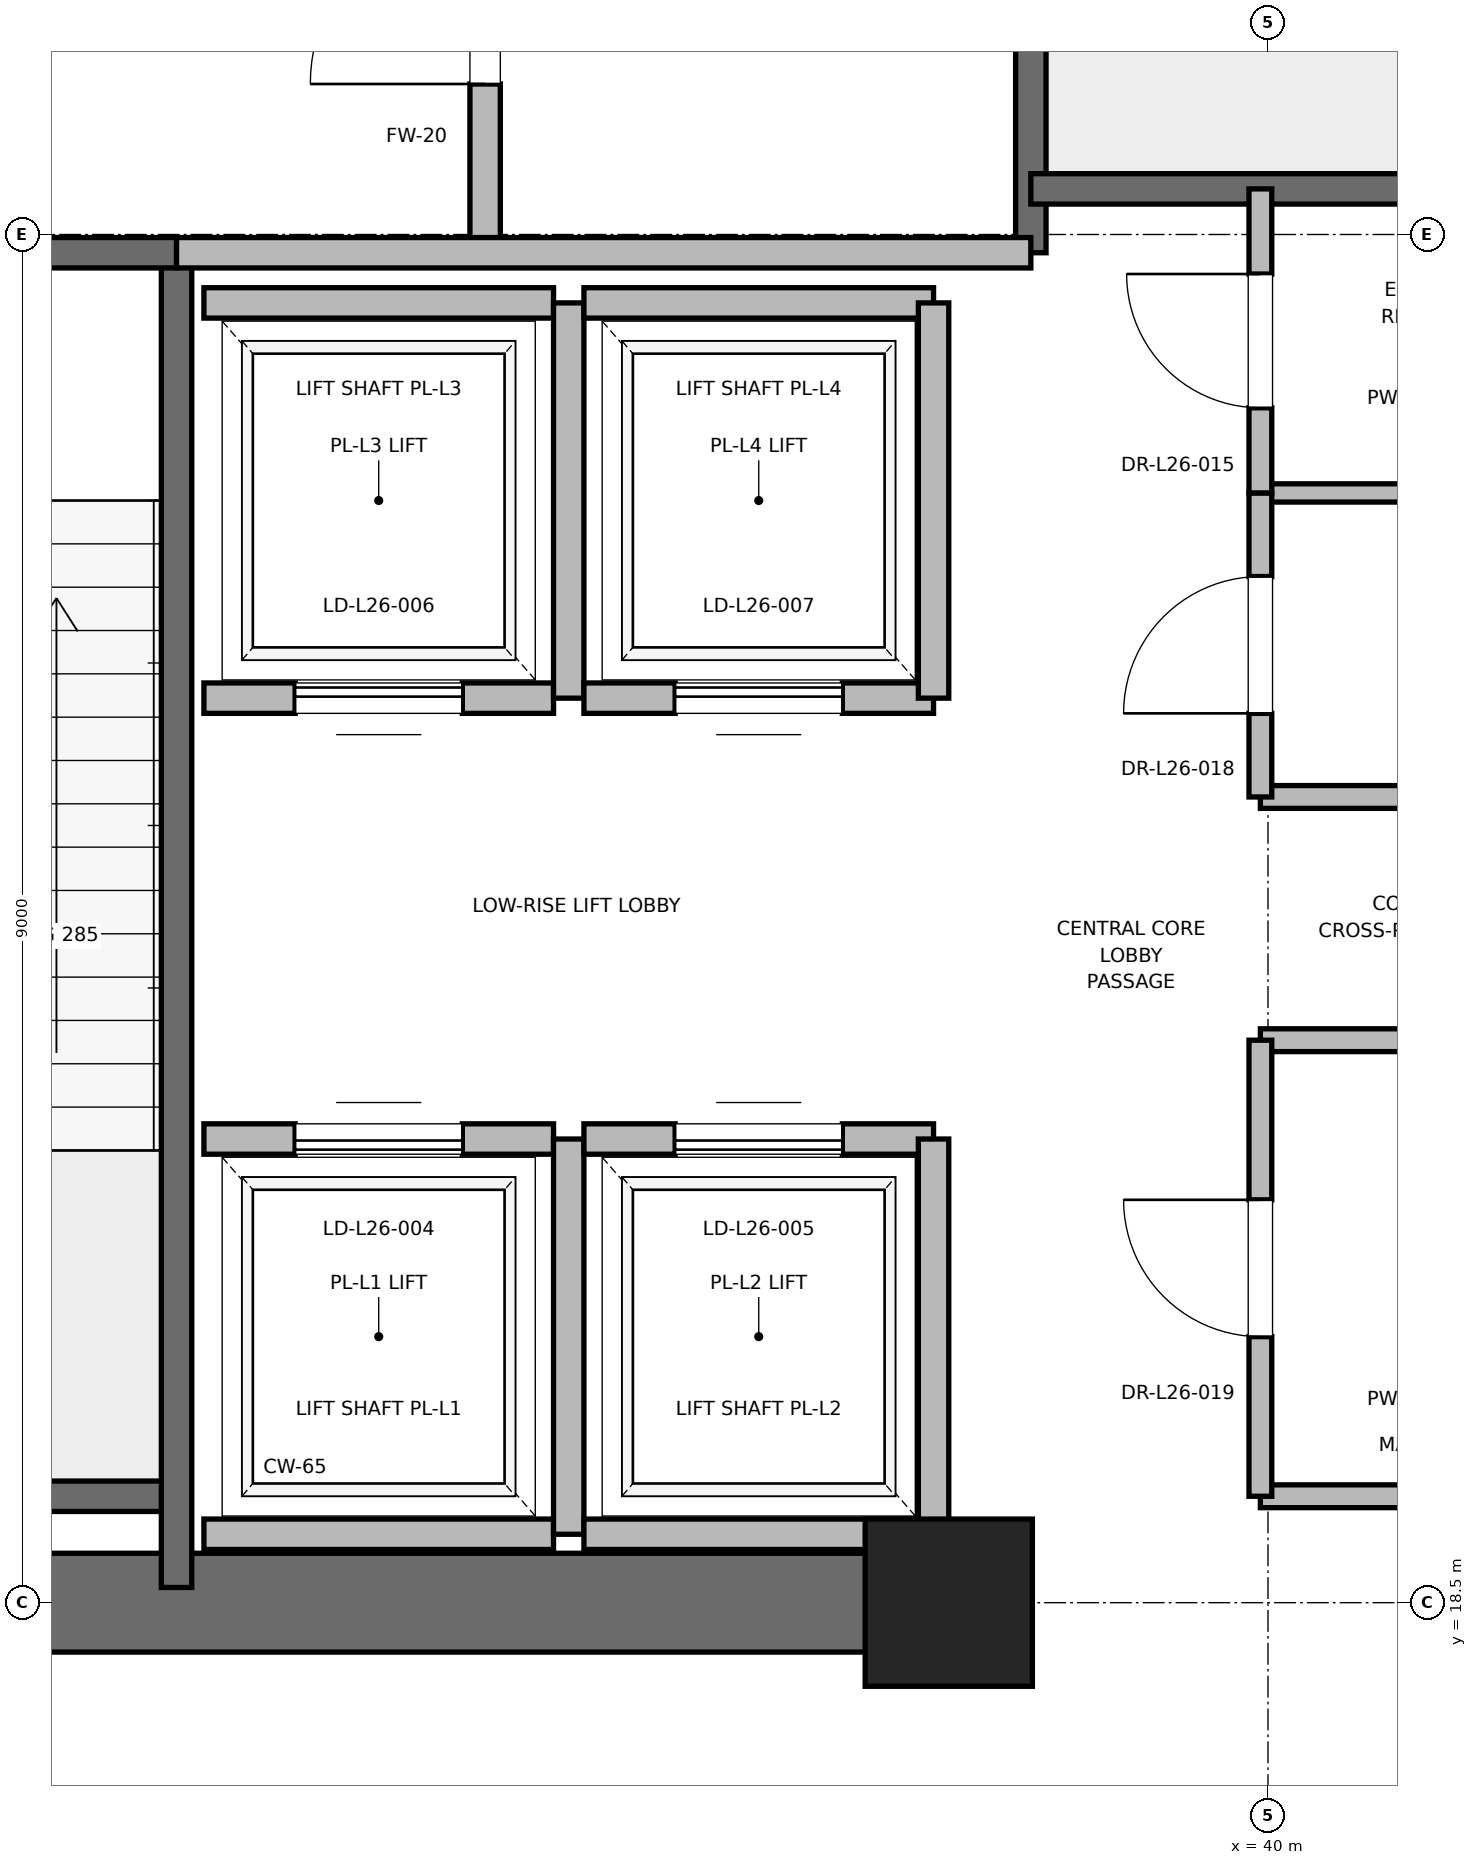
"""IFC4 building model, lengths in metres.
Left out: names, types, materials, properties, quantities, classifications, styles, units other than length and angle.
Written with IfcOpenShell. Run it as: python <this file> out.ifc"""

import sys

from ifc_helpers import new_model, si_unit, direction, frame, frame_2d, origin, origin_2d, place, context, subcontext, project, spatial, rectangle, extrude, element, fill, save


model = new_model("IFC4")
c1 = context("Model", 3, precision=1e-05, world=origin(), true_north=direction((0.0, 1.0)))
c2 = subcontext(c1, "Body", "Model", "MODEL_VIEW")
j1 = project(units=[si_unit("LENGTHUNIT", "METRE"), si_unit("PLANEANGLEUNIT", "RADIAN")], contexts=[c1])
p1 = place(None, origin())
s1 = spatial("IfcSite", under=j1, at=p1, CompositionType="ELEMENT")
p2 = place(p1, origin())
s2 = spatial("IfcBuilding", under=s1, at=p2, CompositionType="ELEMENT")
p3 = place(p2, frame((0.0, 0.0, 113.0)))
s3 = spatial("IfcBuildingStorey", under=s2, at=p3, CompositionType="ELEMENT", Elevation=113.0)
p4 = place(p3, frame((37.9, 18.5, 0.0), z_axis=(0.0, 0.0, 1.0), x_axis=(1.0, 0.0, 0.0)))
e1 = element("IfcColumn", 1, at=p4, inside=s3, PredefinedType="PILASTER", context=c2, shape_type="SweptSolid", body=[
    extrude(rectangle(XDim=1.1, YDim=1.1, at=origin_2d()), origin(), (0.0, 0.0, 1.0), 5.4),
])
p5 = place(p3, frame((29.0, 18.5, 0.0), z_axis=(0.0, 0.0, 1.0), x_axis=(1.0, 0.0, 0.0)))
e2 = element("IfcWall", 2, at=p5, inside=s3, PredefinedType="SHEAR", context=c2, shape_type="SweptSolid", body=[
    extrude(rectangle(XDim=9.2, YDim=0.65, at=frame_2d((4.6, 0.0))), origin(), (0.0, 0.0, 1.0), 5.1),
])
p6 = place(p3, frame((29.7, 19.2, 0.0), z_axis=(0.0, 0.0, 1.0), x_axis=(1.0, 0.0, 0.0)))
e3 = element("IfcWall", 3, at=p6, inside=s3, PredefinedType="SOLIDWALL", context=c2, shape_type="SweptSolid", body=[
    extrude(rectangle(XDim=3.12, YDim=0.2, at=frame_2d((1.56, 0.0))), origin(), (0.0, 0.0, 1.0), 5.1),
])
p7 = place(p3, frame((32.82, 18.6, 0.0), z_axis=(0.0, 0.0, 1.0), x_axis=(0.0, 1.0, 0.0)))
e4 = element("IfcWall", 4, at=p7, inside=s3, PredefinedType="SOLIDWALL", context=c2, shape_type="SweptSolid", body=[
    extrude(rectangle(XDim=8.78, YDim=0.2, at=frame_2d((4.39, 0.0))), origin(), (0.0, 0.0, 1.0), 5.1),
])
p8 = place(p3, frame((29.7, 27.38, 0.0), z_axis=(0.0, 0.0, 1.0), x_axis=(1.0, 0.0, 0.0)))
e5 = element("IfcWall", 5, at=p8, inside=s3, PredefinedType="SOLIDWALL", context=c2, shape_type="SweptSolid", body=[
    extrude(rectangle(XDim=3.12, YDim=0.2, at=frame_2d((1.56, 0.0))), origin(), (0.0, 0.0, 1.0), 5.1),
])
p9 = place(p8, frame((1.01, 0.0, 0.0)))
e6 = element("IfcOpeningElement", 6, at=p9, cuts=e5, PredefinedType="OPENING", context=c2, shape_type="SweptSolid", body=[
    extrude(rectangle(XDim=1.1, YDim=2.15, at=frame_2d((0.55, 1.075))), frame((0.0, 0.1, 0.0), z_axis=(0.0, -1.0, 0.0), x_axis=(1.0, 0.0, 0.0)), (0.0, 0.0, 1.0), 0.2),
])
p10 = place(p3, frame((38.44, 27.38, 0.0), z_axis=(0.0, 0.0, 1.0), x_axis=(0.0, 1.0, 0.0)))
e7 = element("IfcWall", 7, at=p10, inside=s3, PredefinedType="SOLIDWALL", context=c2, shape_type="SweptSolid", body=[
    extrude(rectangle(XDim=8.87, YDim=0.2, at=frame_2d((4.435, 0.0))), origin(), (0.0, 0.0, 1.0), 5.1),
])
p11 = place(p3, frame((38.44, 27.8, 0.0), z_axis=(0.0, 0.0, 1.0), x_axis=(1.0, 0.0, 0.0)))
e8 = element("IfcWall", 8, at=p11, inside=s3, PredefinedType="SOLIDWALL", context=c2, shape_type="SweptSolid", body=[
    extrude(rectangle(XDim=3.32, YDim=0.2, at=frame_2d((1.66, 0.0))), origin(), (0.0, 0.0, 1.0), 5.1),
])
p12 = place(p3, frame((34.85, 27.38, 0.0), z_axis=(0.0, 0.0, 1.0), x_axis=(0.0, 1.0, 0.0)))
e9 = element("IfcWall", 9, at=p12, inside=s3, PredefinedType="PARTITIONING", context=c2, shape_type="SweptSolid", body=[
    extrude(rectangle(XDim=3.37, YDim=0.2, at=frame_2d((1.685, 0.0))), origin(), (0.0, 0.0, 1.0), 5.1),
])
p13 = place(p12, frame((1.11, 0.0, 0.0)))
e10 = element("IfcOpeningElement", 10, at=p13, cuts=e9, PredefinedType="OPENING", context=c2, shape_type="SweptSolid", body=[
    extrude(rectangle(XDim=1.15, YDim=2.2, at=frame_2d((0.575, 1.1))), frame((0.0, 0.1, 0.0), z_axis=(0.0, -1.0, 0.0), x_axis=(1.0, 0.0, 0.0)), (0.0, 0.0, 1.0), 0.2),
])
p14 = place(p3, frame((32.82, 27.38, 0.0), z_axis=(0.0, 0.0, 1.0), x_axis=(1.0, 0.0, 0.0)))
e11 = element("IfcWall", 11, at=p14, inside=s3, PredefinedType="PARTITIONING", context=c2, shape_type="SweptSolid", body=[
    extrude(rectangle(XDim=5.62, YDim=0.2, at=frame_2d((2.81, 0.0))), origin(), (0.0, 0.0, 1.0), 5.1),
])
p15 = place(p3, frame((33.0, 18.95, 0.0), z_axis=(0.0, 0.0, 1.0), x_axis=(1.0, 0.0, 0.0)))
e12 = element("IfcWall", 12, at=p15, inside=s3, PredefinedType="SOLIDWALL", context=c2, shape_type="SweptSolid", body=[
    extrude(rectangle(XDim=2.3, YDim=0.2, at=frame_2d((1.15, 0.0))), origin(), (0.0, 0.0, 1.0), 5.1),
])
p16 = place(p3, frame((35.3, 21.55, 0.0), z_axis=(0.0, 0.0, 1.0), x_axis=(-1.0, 0.0, 0.0)))
e13 = element("IfcWall", 13, at=p16, inside=s3, PredefinedType="SOLIDWALL", context=c2, shape_type="SweptSolid", body=[
    extrude(rectangle(XDim=2.3, YDim=0.2, at=frame_2d((1.15, 0.0))), origin(), (0.0, 0.0, 1.0), 5.1),
])
p17 = place(p16, frame((0.6, 0.0, 0.0)))
e14 = element("IfcOpeningElement", 14, at=p17, cuts=e13, PredefinedType="OPENING", context=c2, shape_type="SweptSolid", body=[
    extrude(rectangle(XDim=1.1, YDim=2.2, at=frame_2d((0.55, 1.1))), frame((0.0, 0.1, 0.0), z_axis=(0.0, -1.0, 0.0), x_axis=(1.0, 0.0, 0.0)), (0.0, 0.0, 1.0), 0.2),
])
p18 = place(p3, frame((35.4, 18.95, 0.0), z_axis=(0.0, 0.0, 1.0), x_axis=(0.0, 1.0, 0.0)))
e15 = element("IfcWall", 15, at=p18, inside=s3, PredefinedType="SOLIDWALL", context=c2, shape_type="SweptSolid", body=[
    extrude(rectangle(XDim=2.6, YDim=0.2, at=frame_2d((1.3, 0.0))), origin(), (0.0, 0.0, 1.0), 5.1),
])
p19 = place(p3, frame((35.5, 18.95, 0.0), z_axis=(0.0, 0.0, 1.0), x_axis=(1.0, 0.0, 0.0)))
e16 = element("IfcWall", 16, at=p19, inside=s3, PredefinedType="SOLIDWALL", context=c2, shape_type="SweptSolid", body=[
    extrude(rectangle(XDim=2.3, YDim=0.2, at=frame_2d((1.15, 0.0))), origin(), (0.0, 0.0, 1.0), 3.88),
])
p20 = place(p3, frame((37.8, 21.55, 0.0), z_axis=(0.0, 0.0, 1.0), x_axis=(-1.0, 0.0, 0.0)))
e17 = element("IfcWall", 17, at=p20, inside=s3, PredefinedType="SOLIDWALL", context=c2, shape_type="SweptSolid", body=[
    extrude(rectangle(XDim=2.3, YDim=0.2, at=frame_2d((1.15, 0.0))), origin(), (0.0, 0.0, 1.0), 5.1),
])
p21 = place(p20, frame((0.6, 0.0, 0.0)))
e18 = element("IfcOpeningElement", 18, at=p21, cuts=e17, PredefinedType="OPENING", context=c2, shape_type="SweptSolid", body=[
    extrude(rectangle(XDim=1.1, YDim=2.2, at=frame_2d((0.55, 1.1))), frame((0.0, 0.1, 0.0), z_axis=(0.0, -1.0, 0.0), x_axis=(1.0, 0.0, 0.0)), (0.0, 0.0, 1.0), 0.2),
])
p22 = place(p3, frame((37.8, 18.95, 0.0), z_axis=(0.0, 0.0, 1.0), x_axis=(0.0, 1.0, 0.0)))
e19 = element("IfcWall", 19, at=p22, inside=s3, PredefinedType="SOLIDWALL", context=c2, shape_type="SweptSolid", body=[
    extrude(rectangle(XDim=2.6, YDim=0.2, at=frame_2d((1.3, 0.0))), origin(), (0.0, 0.0, 1.0), 3.88),
])
p23 = place(p3, frame((33.0, 24.45, 0.0), z_axis=(0.0, 0.0, 1.0), x_axis=(1.0, 0.0, 0.0)))
e20 = element("IfcWall", 20, at=p23, inside=s3, PredefinedType="SOLIDWALL", context=c2, shape_type="SweptSolid", body=[
    extrude(rectangle(XDim=2.3, YDim=0.2, at=frame_2d((1.15, 0.0))), origin(), (0.0, 0.0, 1.0), 5.1),
])
p24 = place(p23, frame((0.6, 0.0, 0.0)))
e21 = element("IfcOpeningElement", 21, at=p24, cuts=e20, PredefinedType="OPENING", context=c2, shape_type="SweptSolid", body=[
    extrude(rectangle(XDim=1.1, YDim=2.2, at=frame_2d((0.55, 1.1))), frame((0.0, 0.1, 0.0), z_axis=(0.0, -1.0, 0.0), x_axis=(1.0, 0.0, 0.0)), (0.0, 0.0, 1.0), 0.2),
])
p25 = place(p3, frame((35.3, 27.05, 0.0), z_axis=(0.0, 0.0, 1.0), x_axis=(-1.0, 0.0, 0.0)))
e22 = element("IfcWall", 22, at=p25, inside=s3, PredefinedType="SOLIDWALL", context=c2, shape_type="SweptSolid", body=[
    extrude(rectangle(XDim=2.3, YDim=0.2, at=frame_2d((1.15, 0.0))), origin(), (0.0, 0.0, 1.0), 5.1),
])
p26 = place(p3, frame((35.4, 24.45, 0.0), z_axis=(0.0, 0.0, 1.0), x_axis=(0.0, 1.0, 0.0)))
e23 = element("IfcWall", 23, at=p26, inside=s3, PredefinedType="SOLIDWALL", context=c2, shape_type="SweptSolid", body=[
    extrude(rectangle(XDim=2.6, YDim=0.2, at=frame_2d((1.3, 0.0))), origin(), (0.0, 0.0, 1.0), 5.1),
])
p27 = place(p3, frame((35.5, 24.45, 0.0), z_axis=(0.0, 0.0, 1.0), x_axis=(1.0, 0.0, 0.0)))
e24 = element("IfcWall", 24, at=p27, inside=s3, PredefinedType="SOLIDWALL", context=c2, shape_type="SweptSolid", body=[
    extrude(rectangle(XDim=2.3, YDim=0.2, at=frame_2d((1.15, 0.0))), origin(), (0.0, 0.0, 1.0), 5.1),
])
p28 = place(p27, frame((0.6, 0.0, 0.0)))
e25 = element("IfcOpeningElement", 25, at=p28, cuts=e24, PredefinedType="OPENING", context=c2, shape_type="SweptSolid", body=[
    extrude(rectangle(XDim=1.1, YDim=2.2, at=frame_2d((0.55, 1.1))), frame((0.0, 0.1, 0.0), z_axis=(0.0, -1.0, 0.0), x_axis=(1.0, 0.0, 0.0)), (0.0, 0.0, 1.0), 0.2),
])
p29 = place(p3, frame((37.8, 27.05, 0.0), z_axis=(0.0, 0.0, 1.0), x_axis=(-1.0, 0.0, 0.0)))
e26 = element("IfcWall", 26, at=p29, inside=s3, PredefinedType="SOLIDWALL", context=c2, shape_type="SweptSolid", body=[
    extrude(rectangle(XDim=2.3, YDim=0.2, at=frame_2d((1.15, 0.0))), origin(), (0.0, 0.0, 1.0), 5.1),
])
p30 = place(p3, frame((37.8, 24.45, 0.0), z_axis=(0.0, 0.0, 1.0), x_axis=(0.0, 1.0, 0.0)))
e27 = element("IfcWall", 27, at=p30, inside=s3, PredefinedType="SOLIDWALL", context=c2, shape_type="SweptSolid", body=[
    extrude(rectangle(XDim=2.6, YDim=0.2, at=frame_2d((1.3, 0.0))), origin(), (0.0, 0.0, 1.0), 5.1),
])
for number, where, z_axis, x_axis in (
    (28, (39.95, 19.2, 0.0), (0.0, 0.0, 1.0), (1.0, 0.0, 0.0)),
    (29, (39.95, 22.2, 0.0), (0.0, 0.0, 1.0), (1.0, 0.0, 0.0)),
    (30, (39.95, 23.8, 0.0), (0.0, 0.0, 1.0), (1.0, 0.0, 0.0)),
):
    element("IfcWall", number, at=place(p3, frame(where, z_axis=z_axis, x_axis=x_axis)), inside=s3, PredefinedType="PARTITIONING", context=c2, shape_type="SweptSolid", body=[
        extrude(rectangle(XDim=1.81, YDim=0.15, at=frame_2d((0.905, 0.0))), origin(), (0.0, 0.0, 1.0), 2.85),
    ])
p31 = place(p3, frame((39.95, 25.8, 0.0), z_axis=(0.0, 0.0, 1.0), x_axis=(1.0, 0.0, 0.0)))
e31 = element("IfcWall", 31, at=p31, inside=s3, PredefinedType="PARTITIONING", context=c2, shape_type="SweptSolid", body=[
    extrude(rectangle(XDim=1.81, YDim=0.12, at=frame_2d((0.905, 0.0))), origin(), (0.0, 0.0, 1.0), 2.85),
])
p32 = place(p3, frame((39.95, 19.2, 0.0), z_axis=(0.0, 0.0, 1.0), x_axis=(0.0, 1.0, 0.0)))
e32 = element("IfcWall", 32, at=p32, inside=s3, PredefinedType="PARTITIONING", context=c2, shape_type="SweptSolid", body=[
    extrude(rectangle(XDim=3.0, YDim=0.15, at=frame_2d((1.5, 0.0))), origin(), (0.0, 0.0, 1.0), 2.85),
])
p33 = place(p32, frame((1.05, 0.0, 0.0)))
e33 = element("IfcOpeningElement", 33, at=p33, cuts=e32, PredefinedType="OPENING", context=c2, shape_type="SweptSolid", body=[
    extrude(rectangle(XDim=0.9, YDim=2.1, at=frame_2d((0.45, 1.05))), frame((0.0, 0.075, 0.0), z_axis=(0.0, -1.0, 0.0), x_axis=(1.0, 0.0, 0.0)), (0.0, 0.0, 1.0), 0.15),
])
p34 = place(p3, frame((39.95, 23.8, 0.0), z_axis=(0.0, 0.0, 1.0), x_axis=(0.0, 1.0, 0.0)))
e34 = element("IfcWall", 34, at=p34, inside=s3, PredefinedType="PARTITIONING", context=c2, shape_type="SweptSolid", body=[
    extrude(rectangle(XDim=2.0, YDim=0.15, at=frame_2d((1.0, 0.0))), origin(), (0.0, 0.0, 1.0), 2.85),
])
p35 = place(p34, frame((0.55, 0.0, 0.0)))
e35 = element("IfcOpeningElement", 35, at=p35, cuts=e34, PredefinedType="OPENING", context=c2, shape_type="SweptSolid", body=[
    extrude(rectangle(XDim=0.9, YDim=2.1, at=frame_2d((0.45, 1.05))), frame((0.0, 0.075, 0.0), z_axis=(0.0, -1.0, 0.0), x_axis=(1.0, 0.0, 0.0)), (0.0, 0.0, 1.0), 0.15),
])
p36 = place(p3, frame((39.95, 25.8, 0.0), z_axis=(0.0, 0.0, 1.0), x_axis=(0.0, 1.0, 0.0)))
e36 = element("IfcWall", 36, at=p36, inside=s3, PredefinedType="PARTITIONING", context=c2, shape_type="SweptSolid", body=[
    extrude(rectangle(XDim=2.0, YDim=0.15, at=frame_2d((1.0, 0.0))), origin(), (0.0, 0.0, 1.0), 2.85),
])
p37 = place(p36, frame((0.56, 0.0, 0.0)))
e37 = element("IfcOpeningElement", 37, at=p37, cuts=e36, PredefinedType="OPENING", context=c2, shape_type="SweptSolid", body=[
    extrude(rectangle(XDim=0.88, YDim=2.1, at=frame_2d((0.44, 1.05))), frame((0.0, 0.075, 0.0), z_axis=(0.0, -1.0, 0.0), x_axis=(1.0, 0.0, 0.0)), (0.0, 0.0, 1.0), 0.15),
])
p38 = place(p13, origin())
e38 = element("IfcDoor", 38, at=p38, inside=s3, OperationType="SINGLE_SWING_LEFT", PredefinedType="DOOR", context=c2, shape_type="SweptSolid", body=[
    extrude(rectangle(XDim=1.15, YDim=2.2, at=frame_2d((0.575, 1.1))), frame((0.0, 0.025, 0.0), z_axis=(0.0, -1.0, 0.0), x_axis=(1.0, 0.0, 0.0)), (0.0, 0.0, 1.0), 0.05),
])
fill(e10, e38)
p39 = place(p17, origin())
e39 = element("IfcDoor", 39, at=p39, inside=s3, OperationType="SLIDING_TO_RIGHT", PredefinedType="DOOR", context=c2, shape_type="SweptSolid", body=[
    extrude(rectangle(XDim=1.1, YDim=2.2, at=frame_2d((0.55, 1.1))), frame((0.0, 0.025, 0.0), z_axis=(0.0, -1.0, 0.0), x_axis=(1.0, 0.0, 0.0)), (0.0, 0.0, 1.0), 0.05),
])
fill(e14, e39)
p40 = place(p21, origin())
e40 = element("IfcDoor", 40, at=p40, inside=s3, OperationType="SLIDING_TO_RIGHT", PredefinedType="DOOR", context=c2, shape_type="SweptSolid", body=[
    extrude(rectangle(XDim=1.1, YDim=2.2, at=frame_2d((0.55, 1.1))), frame((0.0, 0.025, 0.0), z_axis=(0.0, -1.0, 0.0), x_axis=(1.0, 0.0, 0.0)), (0.0, 0.0, 1.0), 0.05),
])
fill(e18, e40)
p41 = place(p24, origin())
e41 = element("IfcDoor", 41, at=p41, inside=s3, OperationType="SLIDING_TO_RIGHT", PredefinedType="DOOR", context=c2, shape_type="SweptSolid", body=[
    extrude(rectangle(XDim=1.1, YDim=2.2, at=frame_2d((0.55, 1.1))), frame((0.0, 0.025, 0.0), z_axis=(0.0, -1.0, 0.0), x_axis=(1.0, 0.0, 0.0)), (0.0, 0.0, 1.0), 0.05),
])
fill(e21, e41)
p42 = place(p28, origin())
e42 = element("IfcDoor", 42, at=p42, inside=s3, OperationType="SLIDING_TO_RIGHT", PredefinedType="DOOR", context=c2, shape_type="SweptSolid", body=[
    extrude(rectangle(XDim=1.1, YDim=2.2, at=frame_2d((0.55, 1.1))), frame((0.0, 0.025, 0.0), z_axis=(0.0, -1.0, 0.0), x_axis=(1.0, 0.0, 0.0)), (0.0, 0.0, 1.0), 0.05),
])
fill(e25, e42)
p43 = place(p33, origin())
e43 = element("IfcDoor", 43, at=p43, inside=s3, OperationType="SINGLE_SWING_RIGHT", PredefinedType="DOOR", context=c2, shape_type="SweptSolid", body=[
    extrude(rectangle(XDim=0.9, YDim=2.1, at=frame_2d((0.45, 1.05))), frame((0.0, 0.025, 0.0), z_axis=(0.0, -1.0, 0.0), x_axis=(1.0, 0.0, 0.0)), (0.0, 0.0, 1.0), 0.05),
])
fill(e33, e43)
p44 = place(p35, origin())
e44 = element("IfcDoor", 44, at=p44, inside=s3, OperationType="SINGLE_SWING_LEFT", PredefinedType="DOOR", context=c2, shape_type="SweptSolid", body=[
    extrude(rectangle(XDim=0.9, YDim=2.1, at=frame_2d((0.45, 1.05))), frame((0.0, 0.025, 0.0), z_axis=(0.0, -1.0, 0.0), x_axis=(1.0, 0.0, 0.0)), (0.0, 0.0, 1.0), 0.05),
])
fill(e35, e44)
p45 = place(p37, origin())
e45 = element("IfcDoor", 45, at=p45, inside=s3, OperationType="SINGLE_SWING_RIGHT", PredefinedType="DOOR", context=c2, shape_type="SweptSolid", body=[
    extrude(rectangle(XDim=0.88, YDim=2.1, at=frame_2d((0.44, 1.05))), frame((0.0, 0.025, 0.0), z_axis=(0.0, -1.0, 0.0), x_axis=(1.0, 0.0, 0.0)), (0.0, 0.0, 1.0), 0.05),
])
fill(e37, e45)
save(model, sys.argv[1])
